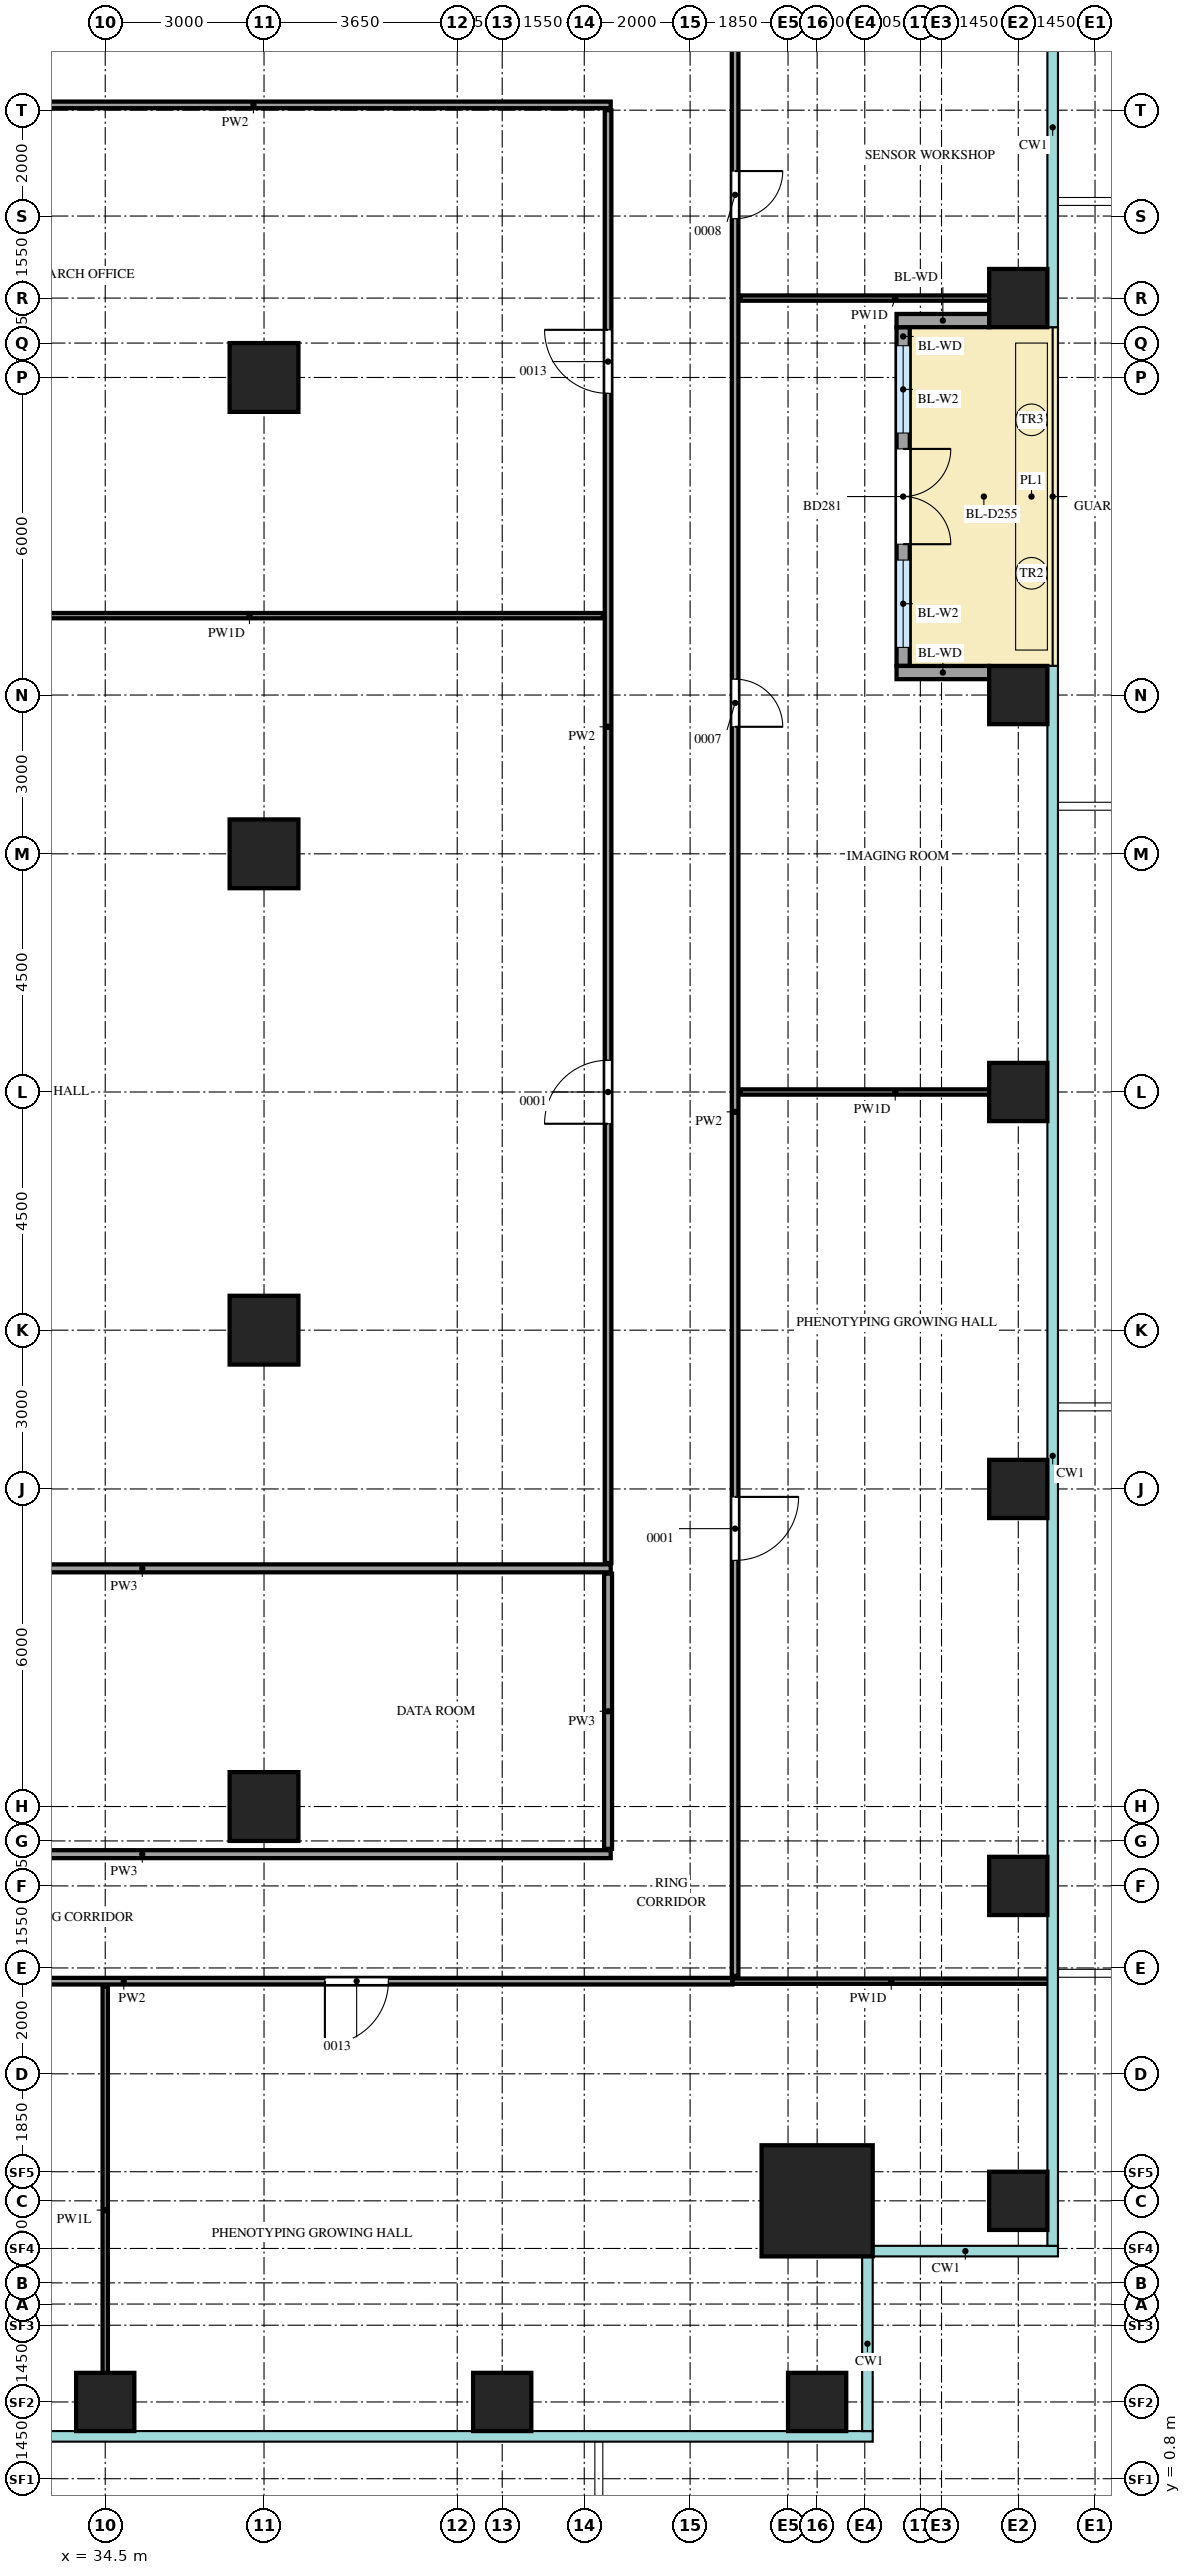
"""IFC4 building model, lengths in metres.
Left out: names, types, materials, properties, quantities, classifications, styles, units other than length and angle.
Written with IfcOpenShell. Run it as: python <this file> out.ifc"""

import sys

from ifc_helpers import new_model, si_unit, direction, frame, frame_2d, origin, origin_2d, place, context, subcontext, project, spatial, rectangle, extrude, source, transform, mapped, element, fill, save


model = new_model("IFC4")
c1 = context("Model", 3, precision=1e-05, world=origin(), true_north=direction((0.0, 1.0)))
c2 = subcontext(c1, "Body", "Model", "MODEL_VIEW")
j1 = project(units=[si_unit("LENGTHUNIT", "METRE"), si_unit("PLANEANGLEUNIT", "RADIAN")], contexts=[c1])
p1 = place(None, origin())
s1 = spatial("IfcSite", under=j1, at=p1, CompositionType="ELEMENT")
p2 = place(p1, origin())
s2 = spatial("IfcBuilding", under=s1, at=p2, CompositionType="ELEMENT")
p3 = place(p2, frame((0.0, 0.0, 132.3)))
s3 = spatial("IfcBuildingStorey", under=s2, at=p3, CompositionType="ELEMENT", Elevation=132.3)
m1 = source(origin(), c2, "Body", "SweptSolid", [
    extrude(rectangle(XDim=2.1, YDim=2.1, at=origin_2d()), origin(), (0.0, 0.0, 1.0), 4.4),
])
p4 = place(p3, frame((47.95, 6.05, 0.0), z_axis=(0.0, 0.0, 1.0), x_axis=(1.0, 0.0, 0.0)))
e1 = element("IfcColumn", 1, at=p4, inside=s3, PredefinedType="COLUMN", context=c2, shape_type="MappedRepresentation", body=[
    mapped(m1, transform((0.0, 0.0, 0.0))),
])
m2 = source(origin(), c2, "Body", "SweptSolid", [
    extrude(rectangle(XDim=1.1, YDim=1.1, at=origin_2d()), origin(), (0.0, 0.0, 1.0), 4.1),
])
for number, where, z_axis, x_axis in (
    (2, (34.5, 2.25, 0.0), (0.0, 0.0, 1.0), (1.0, 0.0, 0.0)),
    (3, (42.0, 2.25, 0.0), (0.0, 0.0, 1.0), (1.0, 0.0, 0.0)),
    (4, (47.95, 2.25, 0.0), (0.0, 0.0, 1.0), (1.0, 0.0, 0.0)),
    (5, (51.75, 6.05, 0.0), (0.0, 0.0, 1.0), (1.0, 0.0, 0.0)),
    (6, (51.75, 12.0, 0.0), (0.0, 0.0, 1.0), (1.0, 0.0, 0.0)),
    (7, (51.75, 19.5, 0.0), (0.0, 0.0, 1.0), (1.0, 0.0, 0.0)),
    (8, (51.75, 27.0, 0.0), (0.0, 0.0, 1.0), (1.0, 0.0, 0.0)),
    (9, (51.75, 34.5, 0.0), (0.0, 0.0, 1.0), (1.0, 0.0, 0.0)),
    (10, (51.75, 42.0, 0.0), (0.0, 0.0, 1.0), (1.0, 0.0, 0.0)),
):
    element("IfcColumn", number, at=place(p3, frame(where, z_axis=z_axis, x_axis=x_axis)), inside=s3, PredefinedType="COLUMN", context=c2, shape_type="MappedRepresentation", body=[
        mapped(m2, transform((0.0, 0.0, 0.0))),
    ])
m3 = source(origin(), c2, "Body", "SweptSolid", [
    extrude(rectangle(XDim=1.3, YDim=1.3, at=origin_2d()), origin(), (0.0, 0.0, 1.0), 4.1),
])
for number, where, z_axis, x_axis in (
    (11, (37.5, 13.5, 0.0), (0.0, 0.0, 1.0), (1.0, 0.0, 0.0)),
    (12, (37.5, 22.5, 0.0), (0.0, 0.0, 1.0), (1.0, 0.0, 0.0)),
    (13, (37.5, 31.5, 0.0), (0.0, 0.0, 1.0), (1.0, 0.0, 0.0)),
    (14, (37.5, 40.5, 0.0), (0.0, 0.0, 1.0), (1.0, 0.0, 0.0)),
):
    element("IfcColumn", number, at=place(p3, frame(where, z_axis=z_axis, x_axis=x_axis)), inside=s3, PredefinedType="COLUMN", context=c2, shape_type="MappedRepresentation", body=[
        mapped(m3, transform((0.0, 0.0, 0.0))),
    ])
m4 = source(origin(), c2, "Body", "SweptSolid", [
    extrude(rectangle(XDim=6.4, YDim=0.25, at=frame_2d((3.2, 0.0))), origin(), (0.0, 0.0, 1.0), 3.55),
])
p5 = place(p3, frame((49.575, 35.05, 0.0), z_axis=(0.0, 0.0, 1.0), x_axis=(0.0, 1.0, 0.0)))
e15 = element("IfcWall", 15, at=p5, inside=s3, PredefinedType="SOLIDWALL", context=c2, shape_type="MappedRepresentation", body=[
    mapped(m4, transform((0.0, 0.0, 0.0))),
])
m5 = source(origin(), c2, "Body", "SweptSolid", [
    extrude(rectangle(XDim=1.65, YDim=2.4, at=frame_2d((0.825, 1.2))), frame((0.0, 0.135, 0.0), z_axis=(0.0, -1.0, 0.0), x_axis=(1.0, 0.0, 0.0)), (0.0, 0.0, 1.0), 0.27),
])
p6 = place(p5, frame((0.35, 0.0, 0.0)))
e16 = element("IfcOpeningElement", 16, at=p6, cuts=e15, PredefinedType="OPENING", context=c2, shape_type="MappedRepresentation", body=[
    mapped(m5, transform((0.0, 0.0, 0.0))),
])
p7 = place(p5, frame((4.4, 0.0, 0.0)))
e17 = element("IfcOpeningElement", 17, at=p7, cuts=e15, PredefinedType="OPENING", context=c2, shape_type="MappedRepresentation", body=[
    mapped(m5, transform((0.0, 0.0, 0.0))),
])
m6 = source(origin(), c2, "Body", "SweptSolid", [
    extrude(rectangle(XDim=1.8, YDim=2.4, at=frame_2d((0.9, 1.2))), frame((0.0, 0.135, 0.0), z_axis=(0.0, -1.0, 0.0), x_axis=(1.0, 0.0, 0.0)), (0.0, 0.0, 1.0), 0.27),
])
p8 = place(p5, frame((2.3, 0.0, 0.0)))
e18 = element("IfcOpeningElement", 18, at=p8, cuts=e15, PredefinedType="OPENING", context=c2, shape_type="MappedRepresentation", body=[
    mapped(m6, transform((0.0, 0.0, 0.0))),
])
m7 = source(origin(), c2, "Body", "SweptSolid", [
    extrude(rectangle(XDim=1.75, YDim=0.25, at=frame_2d((0.875, 0.0))), origin(), (0.0, 0.0, 1.0), 3.55),
])
for number, where, z_axis, x_axis in (
    (19, (51.2, 34.925, 0.0), (0.0, 0.0, 1.0), (-1.0, 0.0, 0.0)),
    (20, (51.2, 41.575, 0.0), (0.0, 0.0, 1.0), (-1.0, 0.0, 0.0)),
):
    element("IfcWall", number, at=place(p3, frame(where, z_axis=z_axis, x_axis=x_axis)), inside=s3, PredefinedType="SOLIDWALL", context=c2, shape_type="MappedRepresentation", body=[
        mapped(m7, transform((0.0, 0.0, 0.0))),
    ])
m8 = source(origin(), c2, "Body", "SweptSolid", [
    extrude(rectangle(XDim=8.45, YDim=0.1, at=frame_2d((4.225, 0.0))), origin(), (0.0, 0.0, 1.0), 3.6),
])
p9 = place(p3, frame((34.5, 1.65, 0.0), z_axis=(0.0, 0.0, 1.0), x_axis=(0.0, 1.0, 0.0)))
e21 = element("IfcWall", 21, at=p9, inside=s3, PredefinedType="PARTITIONING", context=c2, shape_type="MappedRepresentation", body=[
    mapped(m8, transform((0.0, 0.0, 0.0))),
])
m9 = source(origin(), c2, "Body", "SweptSolid", [
    extrude(rectangle(XDim=20.0, YDim=0.125, at=frame_2d((10.0, 0.0))), origin(), (0.0, 0.0, 1.0), 4.2),
])
p10 = place(p3, frame((26.35, 10.2, 0.0), z_axis=(0.0, 0.0, 1.0), x_axis=(1.0, 0.0, 0.0)))
e22 = element("IfcWall", 22, at=p10, inside=s3, PredefinedType="PARTITIONING", context=c2, shape_type="MappedRepresentation", body=[
    mapped(m9, transform((0.0, 0.0, 0.0))),
])
m10 = source(origin(), c2, "Body", "SweptSolid", [
    extrude(rectangle(XDim=1.2, YDim=2.1, at=frame_2d((0.6, 1.05))), frame((0.0, 0.073, 0.0), z_axis=(0.0, -1.0, 0.0), x_axis=(1.0, 0.0, 0.0)), (0.0, 0.0, 1.0), 0.145),
])
p11 = place(p10, frame((3.5, 0.0, 0.0)))
e23 = element("IfcOpeningElement", 23, at=p11, cuts=e22, PredefinedType="OPENING", context=c2, shape_type="MappedRepresentation", body=[
    mapped(m10, transform((0.0, 0.0, 0.0))),
])
p12 = place(p10, frame((12.3, 0.0, 0.0)))
e24 = element("IfcOpeningElement", 24, at=p12, cuts=e22, PredefinedType="OPENING", context=c2, shape_type="MappedRepresentation", body=[
    mapped(m10, transform((0.0, 0.0, 0.0))),
])
m11 = source(origin(), c2, "Body", "SweptSolid", [
    extrude(rectangle(XDim=6.0, YDim=0.1, at=frame_2d((3.0, 0.0))), origin(), (0.0, 0.0, 1.0), 4.2),
])
p13 = place(p3, frame((46.35, 10.2, 0.0), z_axis=(0.0, 0.0, 1.0), x_axis=(1.0, 0.0, 0.0)))
e25 = element("IfcWall", 25, at=p13, inside=s3, PredefinedType="PARTITIONING", context=c2, shape_type="MappedRepresentation", body=[
    mapped(m11, transform((0.0, 0.0, 0.0))),
])
m12 = source(origin(), c2, "Body", "SweptSolid", [
    extrude(rectangle(XDim=37.65, YDim=0.125, at=frame_2d((18.825, 0.0))), origin(), (0.0, 0.0, 1.0), 4.2),
])
p14 = place(p3, frame((46.4, 10.3, 0.0), z_axis=(0.0, 0.0, 1.0), x_axis=(0.0, 1.0, 0.0)))
e26 = element("IfcWall", 26, at=p14, inside=s3, PredefinedType="PARTITIONING", context=c2, shape_type="MappedRepresentation", body=[
    mapped(m12, transform((0.0, 0.0, 0.0))),
])
p15 = place(p14, frame((7.85, 0.0, 0.0)))
e27 = element("IfcOpeningElement", 27, at=p15, cuts=e26, PredefinedType="OPENING", context=c2, shape_type="MappedRepresentation", body=[
    mapped(m10, transform((0.0, 0.0, 0.0))),
])
m13 = source(origin(), c2, "Body", "SweptSolid", [
    extrude(rectangle(XDim=0.9, YDim=2.1, at=frame_2d((0.45, 1.05))), frame((0.0, 0.073, 0.0), z_axis=(0.0, -1.0, 0.0), x_axis=(1.0, 0.0, 0.0)), (0.0, 0.0, 1.0), 0.145),
])
p16 = place(p14, frame((23.6, 0.0, 0.0)))
e28 = element("IfcOpeningElement", 28, at=p16, cuts=e26, PredefinedType="OPENING", context=c2, shape_type="MappedRepresentation", body=[
    mapped(m13, transform((0.0, 0.0, 0.0))),
])
p17 = place(p14, frame((33.2, 0.0, 0.0)))
e29 = element("IfcOpeningElement", 29, at=p17, cuts=e26, PredefinedType="OPENING", context=c2, shape_type="MappedRepresentation", body=[
    mapped(m13, transform((0.0, 0.0, 0.0))),
])
m14 = source(origin(), c2, "Body", "SweptSolid", [
    extrude(rectangle(XDim=17.7, YDim=0.15, at=frame_2d((8.85, 0.0))), origin(), (0.0, 0.0, 1.0), 4.2),
])
p18 = place(p3, frame((26.35, 12.6, 0.0), z_axis=(0.0, 0.0, 1.0), x_axis=(1.0, 0.0, 0.0)))
e30 = element("IfcWall", 30, at=p18, inside=s3, PredefinedType="PARTITIONING", context=c2, shape_type="MappedRepresentation", body=[
    mapped(m14, transform((0.0, 0.0, 0.0))),
])
m15 = source(origin(), c2, "Body", "SweptSolid", [
    extrude(rectangle(XDim=5.2, YDim=0.15, at=frame_2d((2.6, 0.0))), origin(), (0.0, 0.0, 1.0), 4.2),
])
p19 = place(p3, frame((44.0, 12.7, 0.0), z_axis=(0.0, 0.0, 1.0), x_axis=(0.0, 1.0, 0.0)))
e31 = element("IfcWall", 31, at=p19, inside=s3, PredefinedType="PARTITIONING", context=c2, shape_type="MappedRepresentation", body=[
    mapped(m15, transform((0.0, 0.0, 0.0))),
])
p20 = place(p3, frame((26.35, 18.0, 0.0), z_axis=(0.0, 0.0, 1.0), x_axis=(1.0, 0.0, 0.0)))
e32 = element("IfcWall", 32, at=p20, inside=s3, PredefinedType="PARTITIONING", context=c2, shape_type="MappedRepresentation", body=[
    mapped(m14, transform((0.0, 0.0, 0.0))),
])
m16 = source(origin(), c2, "Body", "SweptSolid", [
    extrude(rectangle(XDim=27.45, YDim=0.125, at=frame_2d((13.725, 0.0))), origin(), (0.0, 0.0, 1.0), 4.2),
])
p21 = place(p3, frame((44.0, 18.1, 0.0), z_axis=(0.0, 0.0, 1.0), x_axis=(0.0, 1.0, 0.0)))
e33 = element("IfcWall", 33, at=p21, inside=s3, PredefinedType="PARTITIONING", context=c2, shape_type="MappedRepresentation", body=[
    mapped(m16, transform((0.0, 0.0, 0.0))),
])
p22 = place(p21, frame((8.3, 0.0, 0.0)))
e34 = element("IfcOpeningElement", 34, at=p22, cuts=e33, PredefinedType="OPENING", context=c2, shape_type="MappedRepresentation", body=[
    mapped(m10, transform((0.0, 0.0, 0.0))),
])
p23 = place(p21, frame((22.1, 0.0, 0.0)))
e35 = element("IfcOpeningElement", 35, at=p23, cuts=e33, PredefinedType="OPENING", context=c2, shape_type="MappedRepresentation", body=[
    mapped(m10, transform((0.0, 0.0, 0.0))),
])
m17 = source(origin(), c2, "Body", "SweptSolid", [
    extrude(rectangle(XDim=5.85, YDim=0.1, at=frame_2d((2.925, 0.0))), origin(), (0.0, 0.0, 1.0), 4.2),
])
p24 = place(p3, frame((46.5, 27.0, 0.0), z_axis=(0.0, 0.0, 1.0), x_axis=(1.0, 0.0, 0.0)))
e36 = element("IfcWall", 36, at=p24, inside=s3, PredefinedType="PARTITIONING", context=c2, shape_type="MappedRepresentation", body=[
    mapped(m17, transform((0.0, 0.0, 0.0))),
])
m18 = source(origin(), c2, "Body", "SweptSolid", [
    extrude(rectangle(XDim=13.35, YDim=0.1, at=frame_2d((6.675, 0.0))), origin(), (0.0, 0.0, 1.0), 4.2),
])
p25 = place(p3, frame((30.55, 36.0, 0.0), z_axis=(0.0, 0.0, 1.0), x_axis=(1.0, 0.0, 0.0)))
e37 = element("IfcWall", 37, at=p25, inside=s3, PredefinedType="PARTITIONING", context=c2, shape_type="MappedRepresentation", body=[
    mapped(m18, transform((0.0, 0.0, 0.0))),
])
p26 = place(p3, frame((46.5, 42.0, 0.0), z_axis=(0.0, 0.0, 1.0), x_axis=(1.0, 0.0, 0.0)))
e38 = element("IfcWall", 38, at=p26, inside=s3, PredefinedType="PARTITIONING", context=c2, shape_type="MappedRepresentation", body=[
    mapped(m17, transform((0.0, 0.0, 0.0))),
])
m19 = source(origin(), c2, "Body", "SweptSolid", [
    extrude(rectangle(XDim=13.5, YDim=0.125, at=frame_2d((6.75, 0.0))), origin(), (0.0, 0.0, 1.0), 4.2),
])
p27 = place(p3, frame((30.55, 45.65, 0.0), z_axis=(0.0, 0.0, 1.0), x_axis=(1.0, 0.0, 0.0)))
e39 = element("IfcWall", 39, at=p27, inside=s3, PredefinedType="PARTITIONING", context=c2, shape_type="MappedRepresentation", body=[
    mapped(m19, transform((0.0, 0.0, 0.0))),
])
m20 = source(origin(), c2, "Body", "SweptSolid", [
    extrude(rectangle(XDim=1.65, YDim=2.4, at=frame_2d((0.825, 1.2))), frame((0.0, 0.03, 0.0), z_axis=(0.0, -1.0, 0.0), x_axis=(1.0, 0.0, 0.0)), (0.0, 0.0, 1.0), 0.06),
])
p28 = place(p6, origin())
e40 = element("IfcWindow", 40, at=p28, inside=s3, PartitioningType="SINGLE_PANEL", PredefinedType="WINDOW", context=c2, shape_type="MappedRepresentation", body=[
    mapped(m20, transform((0.0, 0.0, 0.0))),
])
fill(e16, e40)
p29 = place(p7, origin())
e41 = element("IfcWindow", 41, at=p29, inside=s3, PartitioningType="SINGLE_PANEL", PredefinedType="WINDOW", context=c2, shape_type="MappedRepresentation", body=[
    mapped(m20, transform((0.0, 0.0, 0.0))),
])
fill(e17, e41)
m21 = source(origin(), c2, "Body", "SweptSolid", [
    extrude(rectangle(XDim=1.8, YDim=2.4, at=frame_2d((0.9, 1.2))), frame((0.0, 0.025, 0.0), z_axis=(0.0, -1.0, 0.0), x_axis=(1.0, 0.0, 0.0)), (0.0, 0.0, 1.0), 0.05),
])
p30 = place(p8, origin())
e42 = element("IfcDoor", 42, at=p30, inside=s3, OperationType="DOUBLE_DOOR_DOUBLE_SWING", PredefinedType="DOOR", context=c2, shape_type="MappedRepresentation", body=[
    mapped(m21, transform((0.0, 0.0, 0.0))),
])
fill(e18, e42)
m22 = source(origin(), c2, "Body", "SweptSolid", [
    extrude(rectangle(XDim=1.2, YDim=2.1, at=frame_2d((0.6, 1.05))), frame((0.0, 0.025, 0.0), z_axis=(0.0, -1.0, 0.0), x_axis=(1.0, 0.0, 0.0)), (0.0, 0.0, 1.0), 0.05),
])
p31 = place(p12, origin())
e43 = element("IfcDoor", 43, at=p31, inside=s3, OperationType="SINGLE_SWING_LEFT", PredefinedType="DOOR", context=c2, shape_type="MappedRepresentation", body=[
    mapped(m22, transform((0.0, 0.0, 0.0))),
])
fill(e24, e43)
p32 = place(p22, origin())
e44 = element("IfcDoor", 44, at=p32, inside=s3, OperationType="SINGLE_SWING_RIGHT", PredefinedType="DOOR", context=c2, shape_type="MappedRepresentation", body=[
    mapped(m22, transform((0.0, 0.0, 0.0))),
])
fill(e34, e44)
p33 = place(p23, origin())
e45 = element("IfcDoor", 45, at=p33, inside=s3, OperationType="SINGLE_SWING_LEFT", PredefinedType="DOOR", context=c2, shape_type="MappedRepresentation", body=[
    mapped(m22, transform((0.0, 0.0, 0.0))),
])
fill(e35, e45)
p34 = place(p15, origin())
e46 = element("IfcDoor", 46, at=p34, inside=s3, OperationType="SINGLE_SWING_RIGHT", PredefinedType="DOOR", context=c2, shape_type="MappedRepresentation", body=[
    mapped(m22, transform((0.0, 0.0, 0.0))),
])
fill(e27, e46)
m23 = source(origin(), c2, "Body", "SweptSolid", [
    extrude(rectangle(XDim=0.9, YDim=2.1, at=frame_2d((0.45, 1.05))), frame((0.0, 0.025, 0.0), z_axis=(0.0, -1.0, 0.0), x_axis=(1.0, 0.0, 0.0)), (0.0, 0.0, 1.0), 0.05),
])
p35 = place(p16, origin())
e47 = element("IfcDoor", 47, at=p35, inside=s3, OperationType="SINGLE_SWING_LEFT", PredefinedType="DOOR", context=c2, shape_type="MappedRepresentation", body=[
    mapped(m23, transform((0.0, 0.0, 0.0))),
])
fill(e28, e47)
p36 = place(p17, origin())
e48 = element("IfcDoor", 48, at=p36, inside=s3, OperationType="SINGLE_SWING_RIGHT", PredefinedType="DOOR", context=c2, shape_type="MappedRepresentation", body=[
    mapped(m23, transform((0.0, 0.0, 0.0))),
])
fill(e29, e48)
save(model, sys.argv[1])
